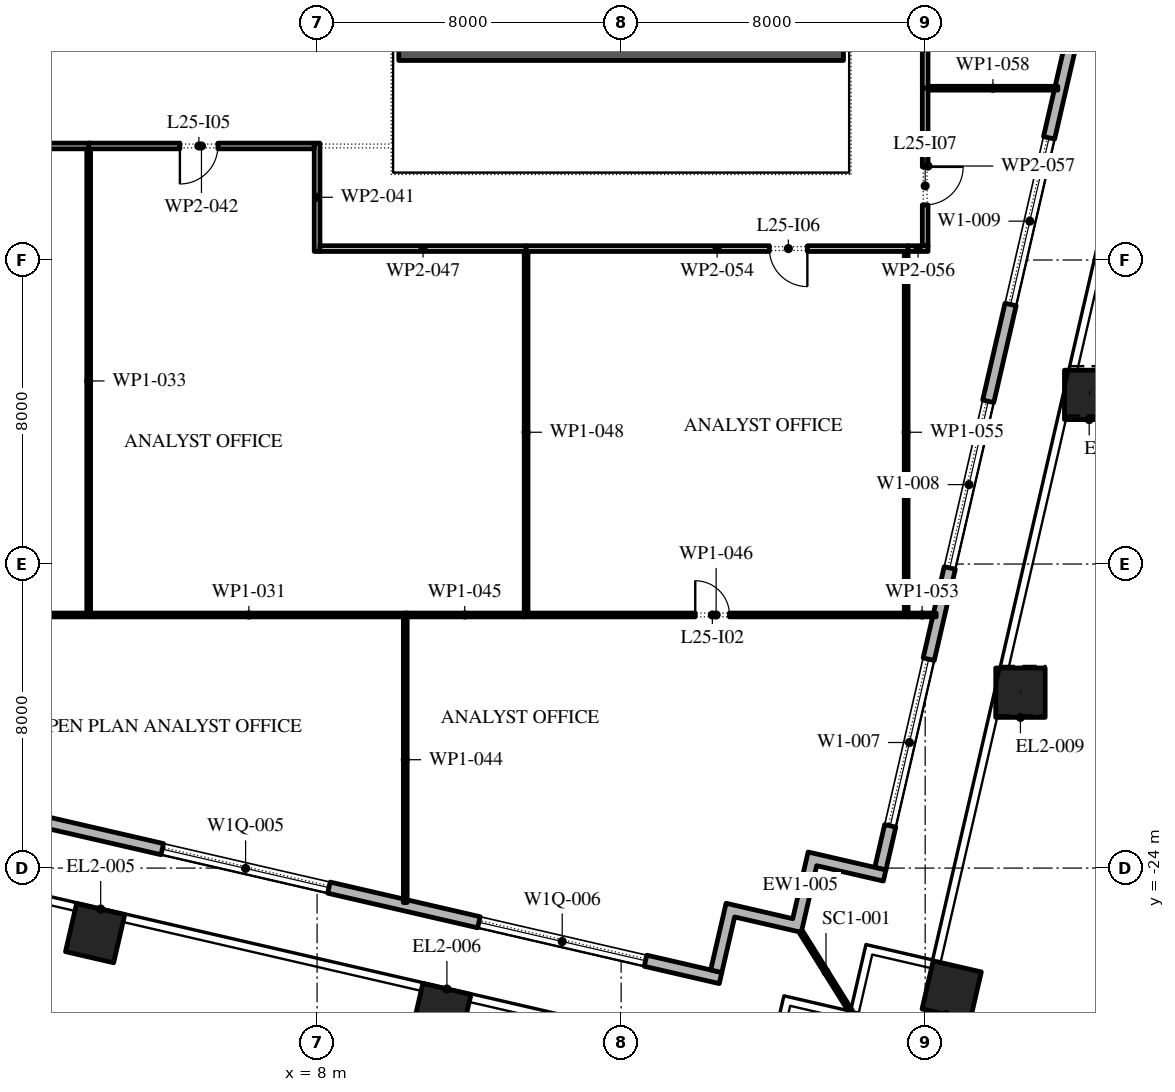
"""IFC4 building model, lengths in metres.
Left out: names, types, materials, properties, quantities, classifications, styles, units other than length and angle.
Written with IfcOpenShell. Run it as: python <this file> out.ifc"""

import sys

from ifc_helpers import new_model, si_unit, direction, frame, frame_2d, origin, origin_2d, place, context, subcontext, project, spatial, polyline, rectangle, outline, extrude, element, fill, save


model = new_model("IFC4")
c1 = context("Model", 3, precision=1e-05, world=origin(), true_north=direction((0.0, 1.0)))
c2 = subcontext(c1, "Body", "Model", "MODEL_VIEW")
j1 = project(units=[si_unit("LENGTHUNIT", "METRE"), si_unit("PLANEANGLEUNIT", "RADIAN")], contexts=[c1])
p1 = place(None, origin())
s1 = spatial("IfcSite", under=j1, at=p1, CompositionType="ELEMENT")
p2 = place(p1, origin())
s2 = spatial("IfcBuilding", under=s1, at=p2, CompositionType="ELEMENT")
p3 = place(p2, frame((0.0, 0.0, 118.2)))
s3 = spatial("IfcBuildingStorey", under=s2, at=p3, CompositionType="ELEMENT", Elevation=118.2)
for number, where, z_axis, x_axis in (
    (1, (2.159, -25.711, 0.0), (0.0, 0.0, 1.0), (0.974, -0.225, 0.0)),
    (2, (11.27, -27.815, 0.0), (0.0, 0.0, 1.0), (0.974, -0.225, 0.0)),
    (3, (24.698, -27.22, 0.0), (0.0, 0.0, 1.0), (0.974, -0.225, 0.0)),
):
    element("IfcColumn", number, at=place(p3, frame(where, z_axis=z_axis, x_axis=x_axis)), inside=s3, PredefinedType="COLUMN", context=c2, shape_type="SweptSolid", body=[
        extrude(rectangle(XDim=1.3, YDim=1.3, at=origin_2d()), origin(), (0.0, 0.0, 1.0), 4.2),
    ])
p4 = place(p3, frame((26.507, -19.385, 0.0), z_axis=(0.002906224189, 0.012671137464, 0.999915494498), x_axis=(-0.974691740237, 0.22355315143, 0.0)))
e4 = element("IfcColumn", 4, at=p4, inside=s3, PredefinedType="COLUMN", context=c2, shape_type="SweptSolid", body=[
    extrude(rectangle(XDim=1.3, YDim=1.3, at=origin_2d()), origin(), (0.0, 0.0, 1.0), 4.2),
])
p5 = place(p3, frame((28.316, -11.549, 0.0), z_axis=(0.005810983994, 0.025277780376, 0.999663576552), x_axis=(-0.974579651079, 0.224041299099, 0.0)))
e5 = element("IfcColumn", 5, at=p5, inside=s3, PredefinedType="COLUMN", context=c2, shape_type="SweptSolid", body=[
    extrude(rectangle(XDim=1.3, YDim=1.3, at=origin_2d()), origin(), (0.0, 0.0, 1.0), 4.201),
])
p6 = place(p3, frame((22.539, -28.569, 0.0), z_axis=(0.0, 0.0, 1.0), x_axis=(0.974370064785, -0.224951054344, 0.0)))
e6 = element("IfcColumn", 6, at=p6, inside=s3, PredefinedType="COLUMN", context=c2, shape_type="SweptSolid", body=[
    extrude(rectangle(XDim=1.3, YDim=1.3, at=origin_2d()), origin(), (0.0, 0.0, 1.0), 4.2),
])
p7 = place(p3, frame((-31.078, -15.421, 0.0), z_axis=(0.0, 0.0, 1.0), x_axis=(0.974370456532, -0.224949357493, 0.0)))
e7 = element("IfcWall", 7, at=p7, inside=s3, PredefinedType="STANDARD", context=c2, shape_type="SweptSolid", body=[
    extrude(rectangle(XDim=51.0, YDim=0.3, at=frame_2d((25.5, 0.0))), origin(), (0.0, 0.0, 1.0), 4.0),
])
p8 = place(p7, frame((1.875, 0.0, 0.45)))
e8 = element("IfcOpeningElement", 8, at=p8, cuts=e7, PredefinedType="OPENING", context=c2, shape_type="SweptSolid", body=[
    extrude(rectangle(XDim=4.5, YDim=2.65, at=frame_2d((2.25, 1.325))), frame((0.0, 0.16, 0.0), z_axis=(0.0, -1.0, 0.0), x_axis=(1.0, 0.0, 0.0)), (0.0, 0.0, 1.0), 0.32),
])
p9 = place(p7, frame((10.275, 0.0, 0.45)))
e9 = element("IfcOpeningElement", 9, at=p9, cuts=e7, PredefinedType="OPENING", context=c2, shape_type="SweptSolid", body=[
    extrude(rectangle(XDim=4.5, YDim=2.525, at=frame_2d((2.25, 1.262))), frame((0.0, 0.16, 0.0), z_axis=(0.0, -1.0, 0.0), x_axis=(1.0, 0.0, 0.0)), (0.0, 0.0, 1.0), 0.32),
])
p10 = place(p7, frame((18.825, 0.0, 0.45)))
e10 = element("IfcOpeningElement", 10, at=p10, cuts=e7, PredefinedType="OPENING", context=c2, shape_type="SweptSolid", body=[
    extrude(rectangle(XDim=4.5, YDim=2.5, at=frame_2d((2.25, 1.25))), frame((0.0, 0.16, 0.0), z_axis=(0.0, -1.0, 0.0), x_axis=(1.0, 0.0, 0.0)), (0.0, 0.0, 1.0), 0.32),
])
p11 = place(p7, frame((28.425, 0.0, 0.0)))
e11 = element("IfcOpeningElement", 11, at=p11, cuts=e7, PredefinedType="OPENING", context=c2, shape_type="SweptSolid", body=[
    extrude(rectangle(XDim=2.4, YDim=2.9, at=frame_2d((1.2, 1.45))), frame((0.0, 0.16, 0.0), z_axis=(0.0, -1.0, 0.0), x_axis=(1.0, 0.0, 0.0)), (0.0, 0.0, 1.0), 0.32),
])
p12 = place(p7, frame((35.925, 0.0, 0.45)))
e12 = element("IfcOpeningElement", 12, at=p12, cuts=e7, PredefinedType="OPENING", context=c2, shape_type="SweptSolid", body=[
    extrude(rectangle(XDim=4.5, YDim=2.45, at=frame_2d((2.25, 1.225))), frame((0.0, 0.16, 0.0), z_axis=(0.0, -1.0, 0.0), x_axis=(1.0, 0.0, 0.0)), (0.0, 0.0, 1.0), 0.32),
])
p13 = place(p7, frame((44.475, 0.0, 0.45)))
e13 = element("IfcOpeningElement", 13, at=p13, cuts=e7, PredefinedType="OPENING", context=c2, shape_type="SweptSolid", body=[
    extrude(rectangle(XDim=4.5, YDim=2.45, at=frame_2d((2.25, 1.225))), frame((0.0, 0.16, 0.0), z_axis=(0.0, -1.0, 0.0), x_axis=(1.0, 0.0, 0.0)), (0.0, 0.0, 1.0), 0.32),
])
p14 = place(p3, frame((22.82, -24.016, 0.0), z_axis=(0.0, 0.0, 1.0), x_axis=(0.224953880882, 0.974369412223, 0.0)))
e14 = element("IfcWall", 14, at=p14, inside=s3, PredefinedType="STANDARD", context=c2, shape_type="SweptSolid", body=[
    extrude(rectangle(XDim=49.5, YDim=0.3, at=frame_2d((24.75, 0.0))), origin(), (0.0, 0.0, 1.0), 4.0),
])
p15 = place(p14, frame((1.157, 0.0, 0.45)))
e15 = element("IfcOpeningElement", 15, at=p15, cuts=e14, PredefinedType="OPENING", context=c2, shape_type="SweptSolid", body=[
    extrude(rectangle(XDim=4.5, YDim=3.05, at=frame_2d((2.25, 1.525))), frame((0.0, 0.16, 0.0), z_axis=(0.0, -1.0, 0.0), x_axis=(1.0, 0.0, 0.0)), (0.0, 0.0, 1.0), 0.32),
])
p16 = place(p14, frame((8.121, 0.0, 0.45)))
e16 = element("IfcOpeningElement", 16, at=p16, cuts=e14, PredefinedType="OPENING", context=c2, shape_type="SweptSolid", body=[
    extrude(rectangle(XDim=4.5, YDim=3.05, at=frame_2d((2.25, 1.525))), frame((0.0, 0.16, 0.0), z_axis=(0.0, -1.0, 0.0), x_axis=(1.0, 0.0, 0.0)), (0.0, 0.0, 1.0), 0.32),
])
p17 = place(p14, frame((15.236, 0.0, 0.45)))
e17 = element("IfcOpeningElement", 17, at=p17, cuts=e14, PredefinedType="OPENING", context=c2, shape_type="SweptSolid", body=[
    extrude(rectangle(XDim=4.5, YDim=3.05, at=frame_2d((2.25, 1.525))), frame((0.0, 0.16, 0.0), z_axis=(0.0, -1.0, 0.0), x_axis=(1.0, 0.0, 0.0)), (0.0, 0.0, 1.0), 0.32),
])
p18 = place(p14, frame((23.4, 0.0, 0.0)))
e18 = element("IfcOpeningElement", 18, at=p18, cuts=e14, PredefinedType="OPENING", context=c2, shape_type="SweptSolid", body=[
    extrude(rectangle(XDim=2.4, YDim=3.5, at=frame_2d((1.2, 1.75))), frame((0.0, 0.16, 0.0), z_axis=(0.0, -1.0, 0.0), x_axis=(1.0, 0.0, 0.0)), (0.0, 0.0, 1.0), 0.32),
])
p19 = place(p14, frame((29.464, 0.0, 0.45)))
e19 = element("IfcOpeningElement", 19, at=p19, cuts=e14, PredefinedType="OPENING", context=c2, shape_type="SweptSolid", body=[
    extrude(rectangle(XDim=4.5, YDim=2.875, at=frame_2d((2.25, 1.438))), frame((0.0, 0.16, 0.0), z_axis=(0.0, -1.0, 0.0), x_axis=(1.0, 0.0, 0.0)), (0.0, 0.0, 1.0), 0.32),
])
p20 = place(p14, frame((36.579, 0.0, 0.45)))
e20 = element("IfcOpeningElement", 20, at=p20, cuts=e14, PredefinedType="OPENING", context=c2, shape_type="SweptSolid", body=[
    extrude(rectangle(XDim=4.5, YDim=2.825, at=frame_2d((2.25, 1.413))), frame((0.0, 0.16, 0.0), z_axis=(0.0, -1.0, 0.0), x_axis=(1.0, 0.0, 0.0)), (0.0, 0.0, 1.0), 0.32),
])
p21 = place(p14, frame((43.693, 0.0, 0.45)))
e21 = element("IfcOpeningElement", 21, at=p21, cuts=e14, PredefinedType="OPENING", context=c2, shape_type="SweptSolid", body=[
    extrude(rectangle(XDim=4.5, YDim=2.75, at=frame_2d((2.25, 1.375))), frame((0.0, 0.16, 0.0), z_axis=(0.0, -1.0, 0.0), x_axis=(1.0, 0.0, 0.0)), (0.0, 0.0, 1.0), 0.32),
])
p22 = place(p3, origin())
e22 = element("IfcWall", 22, at=p22, inside=s3, PredefinedType="STANDARD", context=c2, shape_type="SweptSolid", body=[
    extrude(outline(polyline([(20.515, -25.331), (20.92, -23.577), (22.967, -24.049), (22.899, -24.342), (21.145, -23.937), (20.74, -25.691), (18.986, -25.286), (18.649, -26.747), (18.357, -26.68), (18.762, -24.926), (20.515, -25.331)])), origin(), (0.0, 0.0, 1.0), 4.0),
])
p23 = place(p3, frame((20.74, -25.691, -0.05), z_axis=(0.0, 0.0, 1.0), x_axis=(0.529972121605, -0.848015064914, 0.0)))
e23 = element("IfcWall", 23, at=p23, inside=s3, PredefinedType="STANDARD", context=c2, shape_type="SweptSolid", body=[
    extrude(rectangle(XDim=2.455, YDim=0.1, at=frame_2d((1.228, 0.0))), origin(), (0.0, 0.0, 1.0), 4.05),
])
p24 = place(p3, frame((10.15, -2.6, 0.0), z_axis=(0.0, 0.0, 1.0), x_axis=(1.0, 0.0, 0.0)))
e24 = element("IfcWall", 24, at=p24, inside=s3, PredefinedType="SHEAR", context=c2, shape_type="SweptSolid", body=[
    extrude(rectangle(XDim=11.7, YDim=0.3, at=frame_2d((5.85, 0.0))), origin(), (0.0, 0.0, 1.0), 4.0),
])
p25 = place(p3, frame((-7.55, -17.34, 0.0), z_axis=(0.0, 0.0, 1.0), x_axis=(1.0, 0.0, 0.0)))
e25 = element("IfcWall", 25, at=p25, inside=s3, PredefinedType="PARTITIONING", context=c2, shape_type="SweptSolid", body=[
    extrude(rectangle(XDim=9.59, YDim=0.1, at=frame_2d((4.795, 0.0))), origin(), (0.0, 0.0, 1.0), 4.0),
])
p26 = place(p25, frame((2.5, 0.0, 0.0)))
e26 = element("IfcOpeningElement", 26, at=p26, cuts=e25, PredefinedType="OPENING", context=c2, shape_type="SweptSolid", body=[
    extrude(rectangle(XDim=0.9, YDim=2.1, at=frame_2d((0.45, 1.05))), frame((0.0, 0.06, 0.0), z_axis=(0.0, -1.0, 0.0), x_axis=(1.0, 0.0, 0.0)), (0.0, 0.0, 1.0), 0.12),
])
p27 = place(p3, frame((2.04, -17.34, 0.0), z_axis=(0.0, 0.0, 1.0), x_axis=(1.0, 0.0, 0.0)))
e27 = element("IfcWall", 27, at=p27, inside=s3, PredefinedType="PARTITIONING", context=c2, shape_type="SweptSolid", body=[
    extrude(rectangle(XDim=8.33, YDim=0.1, at=frame_2d((4.165, 0.0))), origin(), (0.0, 0.0, 1.0), 4.0),
])
p28 = place(p3, frame((2.04, -5.0, 0.0), z_axis=(0.0, 0.0, 1.0), x_axis=(-1.0, 0.0, 0.0)))
e28 = element("IfcWall", 28, at=p28, inside=s3, PredefinedType="PARTITIONING", context=c2, shape_type="SweptSolid", body=[
    extrude(rectangle(XDim=9.955, YDim=0.15, at=frame_2d((4.978, 0.0))), origin(), (0.0, 0.0, 1.0), 4.0),
])
p29 = place(p28, frame((3.63, 0.0, 0.0)))
e29 = element("IfcOpeningElement", 29, at=p29, cuts=e28, PredefinedType="OPENING", context=c2, shape_type="SweptSolid", body=[
    extrude(rectangle(XDim=1.0, YDim=2.1, at=frame_2d((0.5, 1.05))), frame((0.0, 0.085, 0.0), z_axis=(0.0, -1.0, 0.0), x_axis=(1.0, 0.0, 0.0)), (0.0, 0.0, 1.0), 0.17),
])
p30 = place(p3, frame((1.99, -5.075, 0.0), z_axis=(0.0, 0.0, 1.0), x_axis=(0.0, -1.0, 0.0)))
e30 = element("IfcWall", 30, at=p30, inside=s3, PredefinedType="PARTITIONING", context=c2, shape_type="SweptSolid", body=[
    extrude(rectangle(XDim=12.215, YDim=0.1, at=frame_2d((6.107, 0.0))), origin(), (0.0, 0.0, 1.0), 4.0),
])
p31 = place(p3, frame((8.0, -7.775, 0.0), z_axis=(0.0, 0.0, 1.0), x_axis=(0.0, 1.0, 0.0)))
e31 = element("IfcWall", 31, at=p31, inside=s3, PredefinedType="PARTITIONING", context=c2, shape_type="SweptSolid", body=[
    extrude(rectangle(XDim=2.85, YDim=0.15, at=frame_2d((1.425, 0.0))), origin(), (0.0, 0.0, 1.0), 4.0),
])
p32 = place(p3, frame((7.925, -5.0, 0.0), z_axis=(0.0, 0.0, 1.0), x_axis=(-1.0, 0.0, 0.0)))
e32 = element("IfcWall", 32, at=p32, inside=s3, PredefinedType="PARTITIONING", context=c2, shape_type="SweptSolid", body=[
    extrude(rectangle(XDim=5.935, YDim=0.15, at=frame_2d((2.968, 0.0))), origin(), (0.0, 0.0, 1.0), 4.0),
])
p33 = place(p32, frame((2.535, 0.0, 0.0)))
e33 = element("IfcOpeningElement", 33, at=p33, cuts=e32, PredefinedType="OPENING", context=c2, shape_type="SweptSolid", body=[
    extrude(rectangle(XDim=1.0, YDim=2.1, at=frame_2d((0.5, 1.05))), frame((0.0, 0.085, 0.0), z_axis=(0.0, -1.0, 0.0), x_axis=(1.0, 0.0, 0.0)), (0.0, 0.0, 1.0), 0.17),
])
p34 = place(p3, frame((10.32, -17.39, 0.0), z_axis=(0.0, 0.0, 1.0), x_axis=(0.0, -1.0, 0.0)))
e34 = element("IfcWall", 34, at=p34, inside=s3, PredefinedType="PARTITIONING", context=c2, shape_type="SweptSolid", body=[
    extrude(rectangle(XDim=7.517, YDim=0.1, at=frame_2d((3.759, 0.0))), origin(), (0.0, 0.0, 1.0), 4.0),
])
p35 = place(p3, frame((10.32, -17.34, 0.0), z_axis=(0.0, 0.0, 1.0), x_axis=(1.0, 0.0, 0.0)))
e35 = element("IfcWall", 35, at=p35, inside=s3, PredefinedType="PARTITIONING", context=c2, shape_type="SweptSolid", body=[
    extrude(rectangle(XDim=3.13, YDim=0.1, at=frame_2d((1.565, 0.0))), origin(), (0.0, 0.0, 1.0), 4.0),
])
p36 = place(p3, frame((13.45, -17.34, 0.0), z_axis=(0.0, 0.0, 1.0), x_axis=(1.0, 0.0, 0.0)))
e36 = element("IfcWall", 36, at=p36, inside=s3, PredefinedType="PARTITIONING", context=c2, shape_type="SweptSolid", body=[
    extrude(rectangle(XDim=10.1, YDim=0.1, at=frame_2d((5.05, 0.0))), origin(), (0.0, 0.0, 1.0), 4.0),
])
p37 = place(p36, frame((4.5, 0.0, 0.0)))
e37 = element("IfcOpeningElement", 37, at=p37, cuts=e36, PredefinedType="OPENING", context=c2, shape_type="SweptSolid", body=[
    extrude(rectangle(XDim=0.9, YDim=2.1, at=frame_2d((0.45, 1.05))), frame((0.0, 0.06, 0.0), z_axis=(0.0, -1.0, 0.0), x_axis=(1.0, 0.0, 0.0)), (0.0, 0.0, 1.0), 0.12),
])
p38 = place(p3, frame((13.5, -7.7, 0.0), z_axis=(0.0, 0.0, 1.0), x_axis=(-1.0, 0.0, 0.0)))
e38 = element("IfcWall", 38, at=p38, inside=s3, PredefinedType="PARTITIONING", context=c2, shape_type="SweptSolid", body=[
    extrude(rectangle(XDim=5.425, YDim=0.15, at=frame_2d((2.712, 0.0))), origin(), (0.0, 0.0, 1.0), 4.0),
])
p39 = place(p3, frame((13.5, -7.775, 0.0), z_axis=(0.0, 0.0, 1.0), x_axis=(0.0, -1.0, 0.0)))
e39 = element("IfcWall", 39, at=p39, inside=s3, PredefinedType="PARTITIONING", context=c2, shape_type="SweptSolid", body=[
    extrude(rectangle(XDim=9.515, YDim=0.1, at=frame_2d((4.758, 0.0))), origin(), (0.0, 0.0, 1.0), 4.0),
])
p40 = place(p3, frame((23.55, -17.34, 0.0), z_axis=(0.0, 0.0, 1.0), x_axis=(1.0, 0.0, 0.0)))
e40 = element("IfcWall", 40, at=p40, inside=s3, PredefinedType="PARTITIONING", context=c2, shape_type="SweptSolid", body=[
    extrude(rectangle(XDim=0.74, YDim=0.1, at=frame_2d((0.37, 0.0))), origin(), (0.0, 0.0, 1.0), 4.0),
])
p41 = place(p3, frame((23.55, -7.7, 0.0), z_axis=(0.0, 0.0, 1.0), x_axis=(-1.0, 0.0, 0.0)))
e41 = element("IfcWall", 41, at=p41, inside=s3, PredefinedType="PARTITIONING", context=c2, shape_type="SweptSolid", body=[
    extrude(rectangle(XDim=10.05, YDim=0.15, at=frame_2d((5.025, 0.0))), origin(), (0.0, 0.0, 1.0), 4.0),
])
p42 = place(p41, frame((2.65, 0.0, 0.0)))
e42 = element("IfcOpeningElement", 42, at=p42, cuts=e41, PredefinedType="OPENING", context=c2, shape_type="SweptSolid", body=[
    extrude(rectangle(XDim=1.0, YDim=2.1, at=frame_2d((0.5, 1.05))), frame((0.0, 0.085, 0.0), z_axis=(0.0, -1.0, 0.0), x_axis=(1.0, 0.0, 0.0)), (0.0, 0.0, 1.0), 0.17),
])
p43 = place(p3, frame((23.5, -7.775, 0.0), z_axis=(0.0, 0.0, 1.0), x_axis=(0.0, -1.0, 0.0)))
e43 = element("IfcWall", 43, at=p43, inside=s3, PredefinedType="PARTITIONING", context=c2, shape_type="SweptSolid", body=[
    extrude(rectangle(XDim=9.515, YDim=0.1, at=frame_2d((4.758, 0.0))), origin(), (0.0, 0.0, 1.0), 4.0),
])
p44 = place(p3, frame((24.075, -7.7, 0.0), z_axis=(0.0, 0.0, 1.0), x_axis=(-1.0, 0.0, 0.0)))
e44 = element("IfcWall", 44, at=p44, inside=s3, PredefinedType="PARTITIONING", context=c2, shape_type="SweptSolid", body=[
    extrude(rectangle(XDim=0.525, YDim=0.15, at=frame_2d((0.262, 0.0))), origin(), (0.0, 0.0, 1.0), 4.0),
])
p45 = place(p3, frame((24.0, -3.43, 0.0), z_axis=(0.0, 0.0, 1.0), x_axis=(0.0, -1.0, 0.0)))
e45 = element("IfcWall", 45, at=p45, inside=s3, PredefinedType="PARTITIONING", context=c2, shape_type="SweptSolid", body=[
    extrude(rectangle(XDim=4.195, YDim=0.15, at=frame_2d((2.098, 0.0))), origin(), (0.0, 0.0, 1.0), 4.0),
])
p46 = place(p45, frame((2.12, 0.0, 0.0)))
e46 = element("IfcOpeningElement", 46, at=p46, cuts=e45, PredefinedType="OPENING", context=c2, shape_type="SweptSolid", body=[
    extrude(rectangle(XDim=1.0, YDim=2.1, at=frame_2d((0.5, 1.05))), frame((0.0, 0.085, 0.0), z_axis=(0.0, -1.0, 0.0), x_axis=(1.0, 0.0, 0.0)), (0.0, 0.0, 1.0), 0.17),
])
p47 = place(p3, frame((24.075, -3.48, 0.0), z_axis=(0.0, 0.0, 1.0), x_axis=(1.0, 0.0, 0.0)))
e47 = element("IfcWall", 47, at=p47, inside=s3, PredefinedType="PARTITIONING", context=c2, shape_type="SweptSolid", body=[
    extrude(rectangle(XDim=3.415, YDim=0.1, at=frame_2d((1.708, 0.0))), origin(), (0.0, 0.0, 1.0), 4.0),
])
p48 = place(p3, frame((24.0, 2.61, 0.0), z_axis=(0.0, 0.0, 1.0), x_axis=(0.0, -1.0, 0.0)))
e48 = element("IfcWall", 48, at=p48, inside=s3, PredefinedType="PARTITIONING", context=c2, shape_type="SweptSolid", body=[
    extrude(rectangle(XDim=6.09, YDim=0.15, at=frame_2d((3.045, 0.0))), origin(), (0.0, 0.0, 1.0), 4.0),
])
p49 = place(p48, frame((1.94, 0.0, 0.0)))
e49 = element("IfcOpeningElement", 49, at=p49, cuts=e48, PredefinedType="OPENING", context=c2, shape_type="SweptSolid", body=[
    extrude(rectangle(XDim=1.0, YDim=2.1, at=frame_2d((0.5, 1.05))), frame((0.0, 0.085, 0.0), z_axis=(0.0, -1.0, 0.0), x_axis=(1.0, 0.0, 0.0)), (0.0, 0.0, 1.0), 0.17),
])
p50 = place(p12, origin())
e50 = element("IfcWindow", 50, at=p50, inside=s3, PartitioningType="DOUBLE_PANEL_VERTICAL", PredefinedType="WINDOW", context=c2, shape_type="SweptSolid", body=[
    extrude(rectangle(XDim=4.5, YDim=2.45, at=frame_2d((2.25, 1.225))), frame((0.0, 0.03, 0.0), z_axis=(0.0, -1.0, 0.0), x_axis=(1.0, 0.0, 0.0)), (0.0, 0.0, 1.0), 0.06),
])
fill(e12, e50)
p51 = place(p13, origin())
e51 = element("IfcWindow", 51, at=p51, inside=s3, PartitioningType="DOUBLE_PANEL_VERTICAL", PredefinedType="WINDOW", context=c2, shape_type="SweptSolid", body=[
    extrude(rectangle(XDim=4.5, YDim=2.45, at=frame_2d((2.25, 1.225))), frame((0.0, 0.03, 0.0), z_axis=(0.0, -1.0, 0.0), x_axis=(1.0, 0.0, 0.0)), (0.0, 0.0, 1.0), 0.06),
])
fill(e13, e51)
p52 = place(p15, origin())
e52 = element("IfcWindow", 52, at=p52, inside=s3, PartitioningType="DOUBLE_PANEL_VERTICAL", PredefinedType="WINDOW", context=c2, shape_type="SweptSolid", body=[
    extrude(rectangle(XDim=4.5, YDim=3.05, at=frame_2d((2.25, 1.525))), frame((0.0, 0.03, 0.0), z_axis=(0.0, -1.0, 0.0), x_axis=(1.0, 0.0, 0.0)), (0.0, 0.0, 1.0), 0.06),
])
fill(e15, e52)
p53 = place(p16, origin())
e53 = element("IfcWindow", 53, at=p53, inside=s3, PartitioningType="DOUBLE_PANEL_VERTICAL", PredefinedType="WINDOW", context=c2, shape_type="SweptSolid", body=[
    extrude(rectangle(XDim=4.5, YDim=3.05, at=frame_2d((2.25, 1.525))), frame((0.0, 0.03, 0.0), z_axis=(0.0, -1.0, 0.0), x_axis=(1.0, 0.0, 0.0)), (0.0, 0.0, 1.0), 0.06),
])
fill(e16, e53)
p54 = place(p17, origin())
e54 = element("IfcWindow", 54, at=p54, inside=s3, PartitioningType="DOUBLE_PANEL_VERTICAL", PredefinedType="WINDOW", context=c2, shape_type="SweptSolid", body=[
    extrude(rectangle(XDim=4.5, YDim=3.05, at=frame_2d((2.25, 1.525))), frame((0.0, 0.03, 0.0), z_axis=(0.0, -1.0, 0.0), x_axis=(1.0, 0.0, 0.0)), (0.0, 0.0, 1.0), 0.06),
])
fill(e17, e54)
p55 = place(p37, origin())
e55 = element("IfcDoor", 55, at=p55, inside=s3, OperationType="SINGLE_SWING_RIGHT", PredefinedType="DOOR", context=c2, shape_type="SweptSolid", body=[
    extrude(rectangle(XDim=0.9, YDim=2.1, at=frame_2d((0.45, 1.05))), frame((0.0, 0.025, 0.0), z_axis=(0.0, -1.0, 0.0), x_axis=(1.0, 0.0, 0.0)), (0.0, 0.0, 1.0), 0.05),
])
fill(e37, e55)
p56 = place(p33, origin())
e56 = element("IfcDoor", 56, at=p56, inside=s3, OperationType="SINGLE_SWING_LEFT", PredefinedType="DOOR", context=c2, shape_type="SweptSolid", body=[
    extrude(rectangle(XDim=1.0, YDim=2.1, at=frame_2d((0.5, 1.05))), frame((0.0, 0.025, 0.0), z_axis=(0.0, -1.0, 0.0), x_axis=(1.0, 0.0, 0.0)), (0.0, 0.0, 1.0), 0.05),
])
fill(e33, e56)
p57 = place(p42, origin())
e57 = element("IfcDoor", 57, at=p57, inside=s3, OperationType="SINGLE_SWING_RIGHT", PredefinedType="DOOR", context=c2, shape_type="SweptSolid", body=[
    extrude(rectangle(XDim=1.0, YDim=2.1, at=frame_2d((0.5, 1.05))), frame((0.0, 0.025, 0.0), z_axis=(0.0, -1.0, 0.0), x_axis=(1.0, 0.0, 0.0)), (0.0, 0.0, 1.0), 0.05),
])
fill(e42, e57)
p58 = place(p46, origin())
e58 = element("IfcDoor", 58, at=p58, inside=s3, OperationType="SINGLE_SWING_RIGHT", PredefinedType="DOOR", context=c2, shape_type="SweptSolid", body=[
    extrude(rectangle(XDim=1.0, YDim=2.1, at=frame_2d((0.5, 1.05))), frame((0.0, 0.025, 0.0), z_axis=(0.0, -1.0, 0.0), x_axis=(1.0, 0.0, 0.0)), (0.0, 0.0, 1.0), 0.05),
])
fill(e46, e58)
save(model, sys.argv[1])
